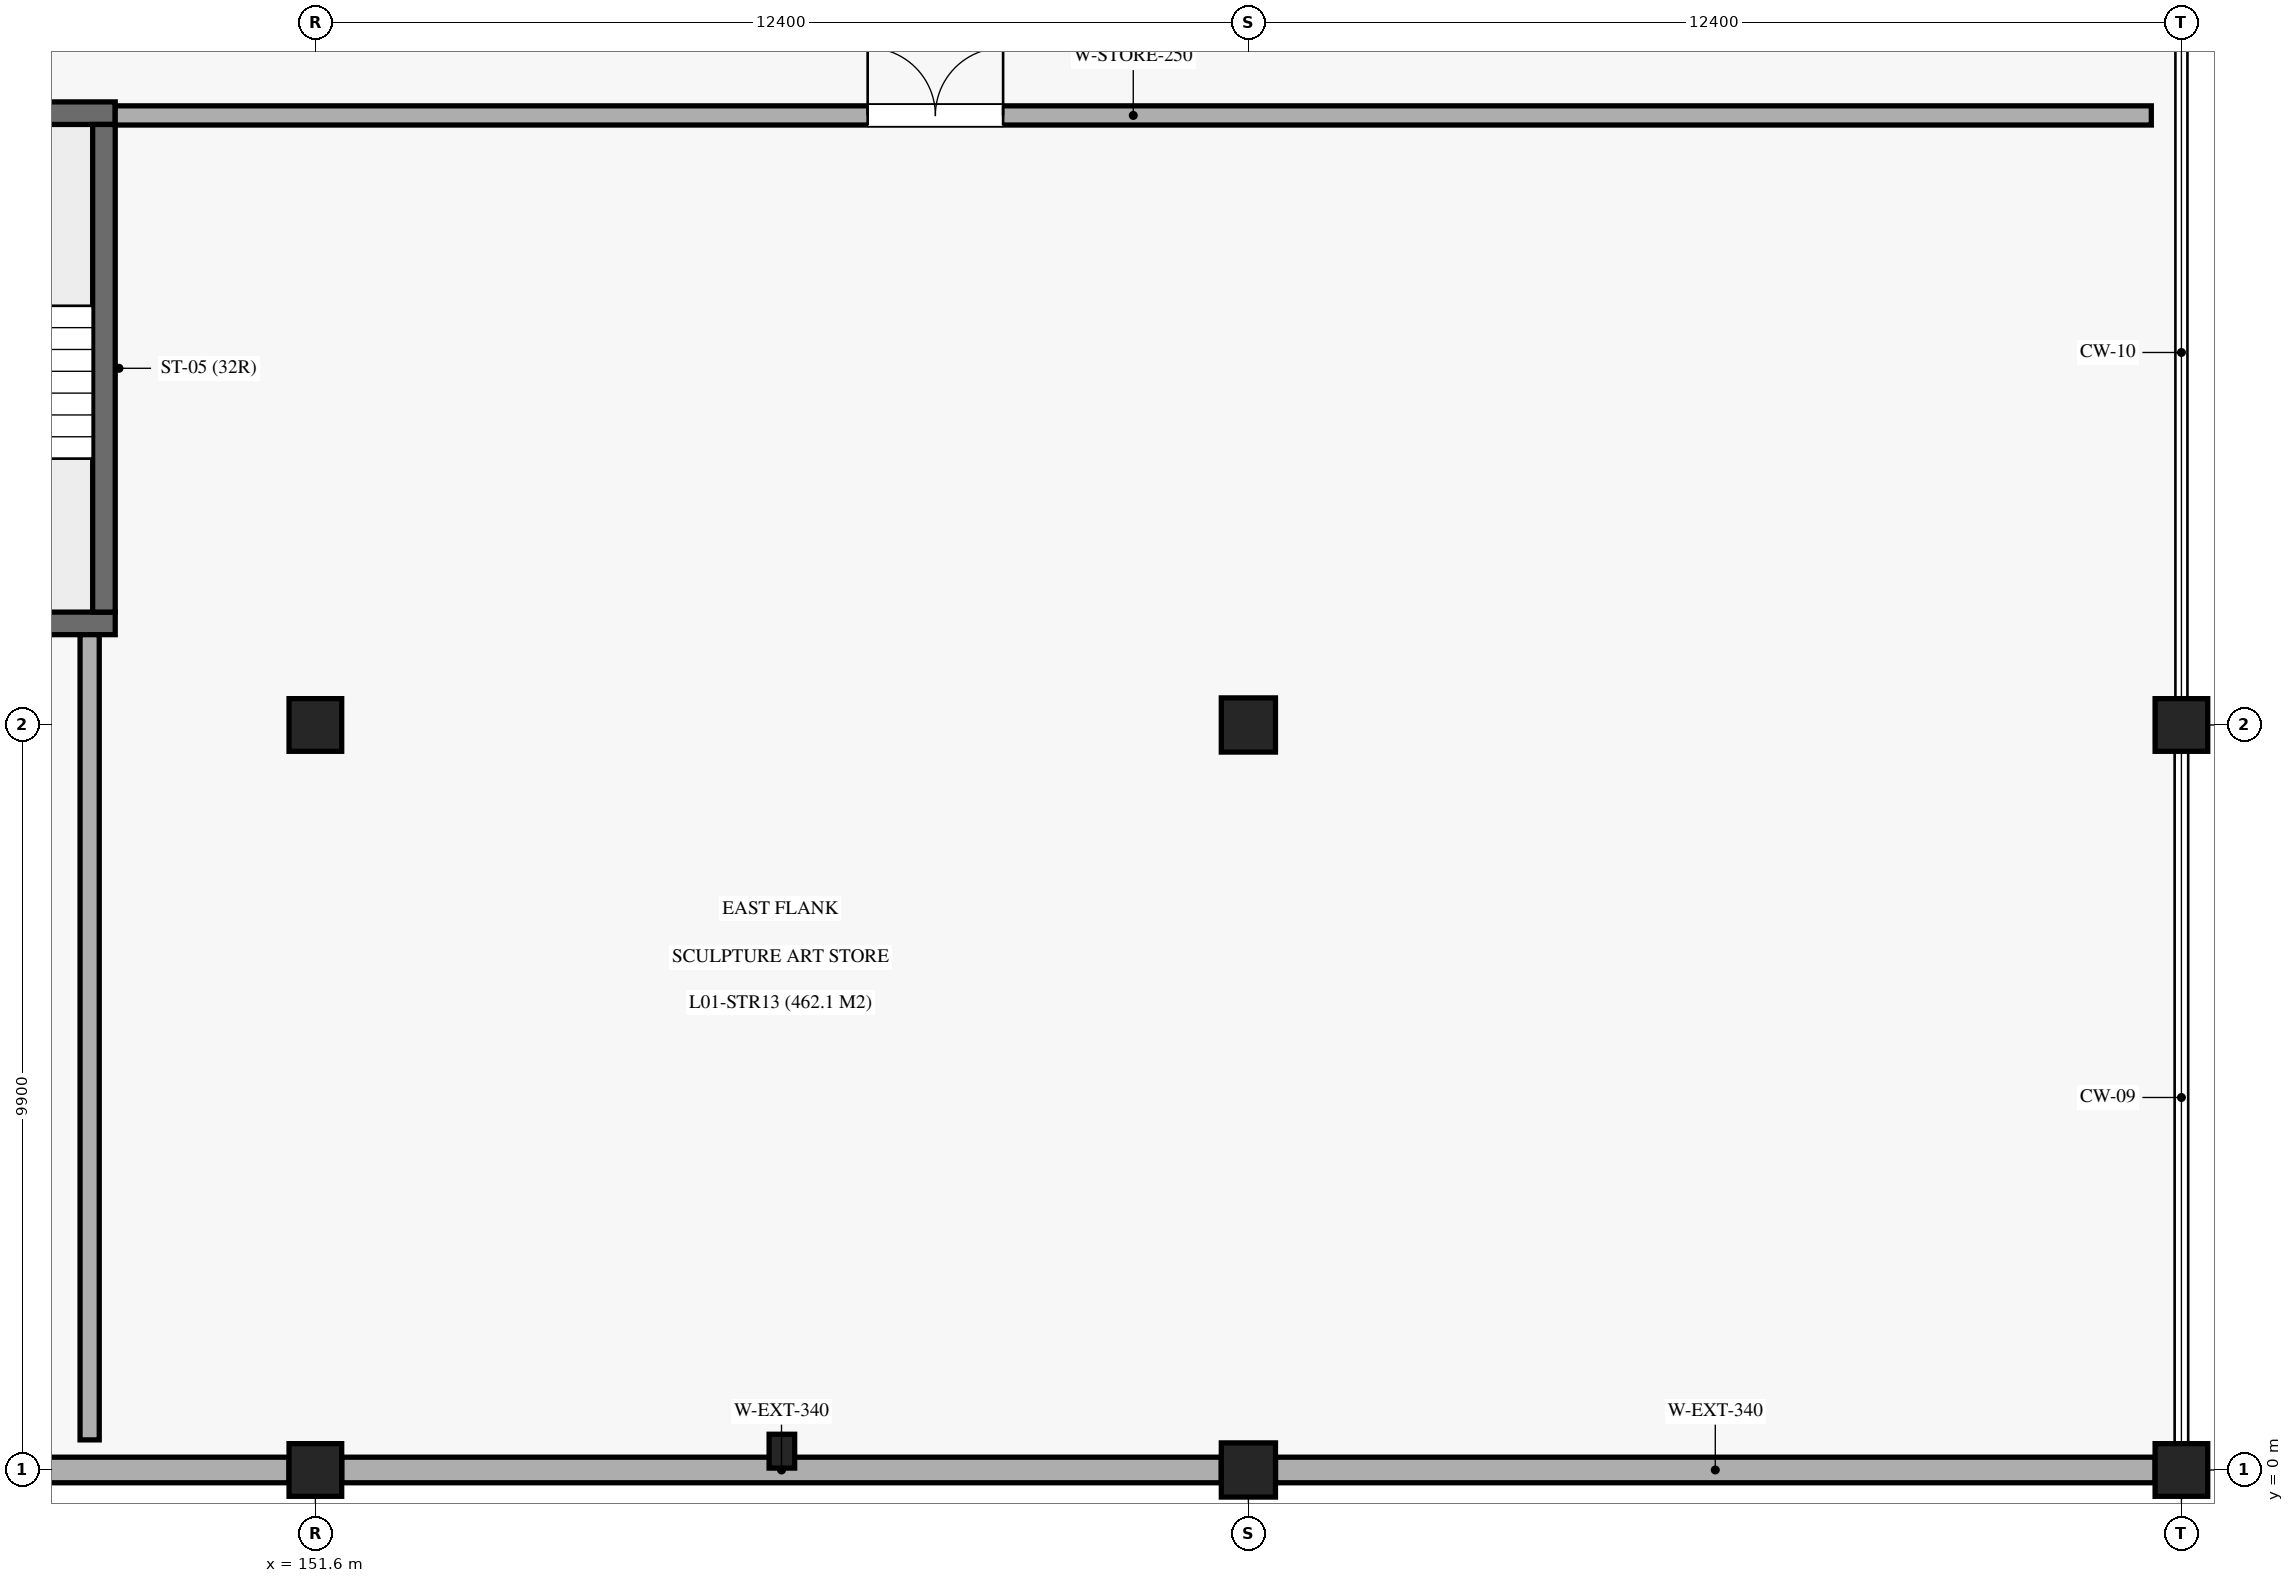
"""IFC4 building model, lengths in metres.
Left out: names, types, materials, properties, quantities, classifications, styles, units other than length and angle.
Written with IfcOpenShell. Run it as: python <this file> out.ifc"""

import sys

from ifc_helpers import new_model, si_unit, direction, frame, frame_2d, origin, origin_2d, place, context, subcontext, project, spatial, rectangle, circle, extrude, element, fill, save


model = new_model("IFC4")
c1 = context("Model", 3, precision=1e-05, world=origin(), true_north=direction((0.0, 1.0)))
c2 = subcontext(c1, "Body", "Model", "MODEL_VIEW")
j1 = project(units=[si_unit("LENGTHUNIT", "METRE"), si_unit("PLANEANGLEUNIT", "RADIAN")], contexts=[c1])
p1 = place(None, origin())
s1 = spatial("IfcSite", under=j1, at=p1, CompositionType="ELEMENT")
p2 = place(p1, origin())
s2 = spatial("IfcBuilding", under=s1, at=p2, CompositionType="ELEMENT")
p3 = place(p2, frame((0.0, 0.0, 5.44)))
s3 = spatial("IfcBuildingStorey", under=s2, at=p3, CompositionType="ELEMENT", Elevation=5.44)
for number, where, z_axis, x_axis in (
    (1, (151.6, 0.0, 0.0), (0.0, 0.0, 1.0), (1.0, 0.0, 0.0)),
    (2, (151.6, 9.9, 0.0), (0.0, 0.0, 1.0), (1.0, 0.0, 0.0)),
):
    element("IfcColumn", number, at=place(p3, frame(where, z_axis=z_axis, x_axis=x_axis)), inside=s3, PredefinedType="COLUMN", context=c2, shape_type="SweptSolid", body=[
        extrude(rectangle(XDim=0.7, YDim=0.7, at=origin_2d()), origin(), (0.0, 0.0, 1.0), 5.44),
    ])
for number, where, z_axis, x_axis in (
    (3, (164.0, 0.0, 0.0), (0.0, 0.0, 1.0), (1.0, 0.0, 0.0)),
    (4, (164.0, 9.9, 0.0), (0.0, 0.0, 1.0), (1.0, 0.0, 0.0)),
):
    element("IfcColumn", number, at=place(p3, frame(where, z_axis=z_axis, x_axis=x_axis)), inside=s3, PredefinedType="COLUMN", context=c2, shape_type="SweptSolid", body=[
        extrude(circle(Radius=0.36, at=origin_2d()), origin(), (0.0, 0.0, 1.0), 5.44),
    ])
for number, where, z_axis, x_axis in (
    (5, (176.4, 0.0, 0.0), (0.0, 0.0, 1.0), (1.0, 0.0, 0.0)),
    (6, (176.4, 9.9, 0.0), (0.0, 0.0, 1.0), (1.0, 0.0, 0.0)),
):
    element("IfcColumn", number, at=place(p3, frame(where, z_axis=z_axis, x_axis=x_axis)), inside=s3, PredefinedType="COLUMN", context=c2, shape_type="SweptSolid", body=[
        extrude(rectangle(XDim=0.7, YDim=0.7, at=origin_2d()), origin(), (0.0, 0.0, 1.0), 5.44),
    ])
p4 = place(p3, frame((157.8, 0.25, 0.0), z_axis=(0.0, 0.0, 1.0), x_axis=(1.0, 0.0, 0.0)))
e7 = element("IfcColumn", 7, at=p4, inside=s3, PredefinedType="PILASTER", context=c2, shape_type="SweptSolid", body=[
    extrude(rectangle(XDim=0.34, YDim=0.45, at=origin_2d()), origin(), (0.0, 0.0, 1.0), 5.44),
])
p5 = place(p3, frame((139.55, 0.0, 0.0), z_axis=(0.0, 0.0, 1.0), x_axis=(1.0, 0.0, 0.0)))
e8 = element("IfcWall", 8, at=p5, inside=s3, PredefinedType="SOLIDWALL", context=c2, shape_type="SweptSolid", body=[
    extrude(rectangle(XDim=11.7, YDim=0.34, at=frame_2d((5.85, 0.0))), origin(), (0.0, 0.0, 1.0), 4.4),
])
for number, where, z_axis, x_axis in (
    (9, (151.95, 0.0, 0.0), (0.0, 0.0, 1.0), (1.0, 0.0, 0.0)),
    (10, (164.36, 0.0, 0.0), (0.0, 0.0, 1.0), (1.0, 0.0, 0.0)),
):
    element("IfcWall", number, at=place(p3, frame(where, z_axis=z_axis, x_axis=x_axis)), inside=s3, PredefinedType="SOLIDWALL", context=c2, shape_type="SweptSolid", body=[
        extrude(rectangle(XDim=11.69, YDim=0.34, at=frame_2d((5.845, 0.0))), origin(), (0.0, 0.0, 1.0), 4.4),
    ])
for number, where, z_axis, x_axis in (
    (11, (141.86, 11.25, 0.0), (0.0, 0.0, 1.0), (1.0, 0.0, 0.0)),
    (12, (141.86, 18.03, 0.0), (0.0, 0.0, 1.0), (1.0, 0.0, 0.0)),
):
    element("IfcWall", number, at=place(p3, frame(where, z_axis=z_axis, x_axis=x_axis)), inside=s3, PredefinedType="SHEAR", context=c2, shape_type="SweptSolid", body=[
        extrude(rectangle(XDim=7.08, YDim=0.3, at=frame_2d((3.54, 0.0))), origin(), (0.0, 0.0, 1.0), 5.18),
    ])
p6 = place(p3, frame((148.79, 11.4, 0.0), z_axis=(0.0, 0.0, 1.0), x_axis=(0.0, 1.0, 0.0)))
e13 = element("IfcWall", 13, at=p6, inside=s3, PredefinedType="SHEAR", context=c2, shape_type="SweptSolid", body=[
    extrude(rectangle(XDim=6.48, YDim=0.3, at=frame_2d((3.24, 0.0))), origin(), (0.0, 0.0, 1.0), 5.18),
])
p7 = place(p3, frame((148.94, 18.0, 0.0), z_axis=(0.0, 0.0, 1.0), x_axis=(1.0, 0.0, 0.0)))
e14 = element("IfcWall", 14, at=p7, inside=s3, PredefinedType="SOLIDWALL", context=c2, shape_type="SweptSolid", body=[
    extrude(rectangle(XDim=27.06, YDim=0.255, at=frame_2d((13.53, 0.0))), origin(), (0.0, 0.0, 1.0), 4.3),
])
p8 = place(p7, frame((10.0, 0.0, 0.0)))
e15 = element("IfcOpeningElement", 15, at=p8, cuts=e14, PredefinedType="OPENING", context=c2, shape_type="SweptSolid", body=[
    extrude(rectangle(XDim=1.8, YDim=2.35, at=frame_2d((0.9, 1.175))), frame((0.0, 0.137, 0.0), z_axis=(0.0, -1.0, 0.0), x_axis=(1.0, 0.0, 0.0)), (0.0, 0.0, 1.0), 0.275),
])
p9 = place(p3, frame((148.6, 0.4, 0.0), z_axis=(0.0, 0.0, 1.0), x_axis=(0.0, 1.0, 0.0)))
e16 = element("IfcWall", 16, at=p9, inside=s3, PredefinedType="SOLIDWALL", context=c2, shape_type="SweptSolid", body=[
    extrude(rectangle(XDim=10.7, YDim=0.255, at=frame_2d((5.35, 0.0))), origin(), (0.0, 0.0, 1.0), 4.3),
])
p10 = place(p8, origin())
e17 = element("IfcDoor", 17, at=p10, inside=s3, OperationType="DOUBLE_DOOR_SINGLE_SWING", PredefinedType="DOOR", context=c2, shape_type="SweptSolid", body=[
    extrude(rectangle(XDim=1.8, YDim=2.35, at=frame_2d((0.9, 1.175))), frame((0.0, 0.025, 0.0), z_axis=(0.0, -1.0, 0.0), x_axis=(1.0, 0.0, 0.0)), (0.0, 0.0, 1.0), 0.05),
])
fill(e15, e17)
save(model, sys.argv[1])
